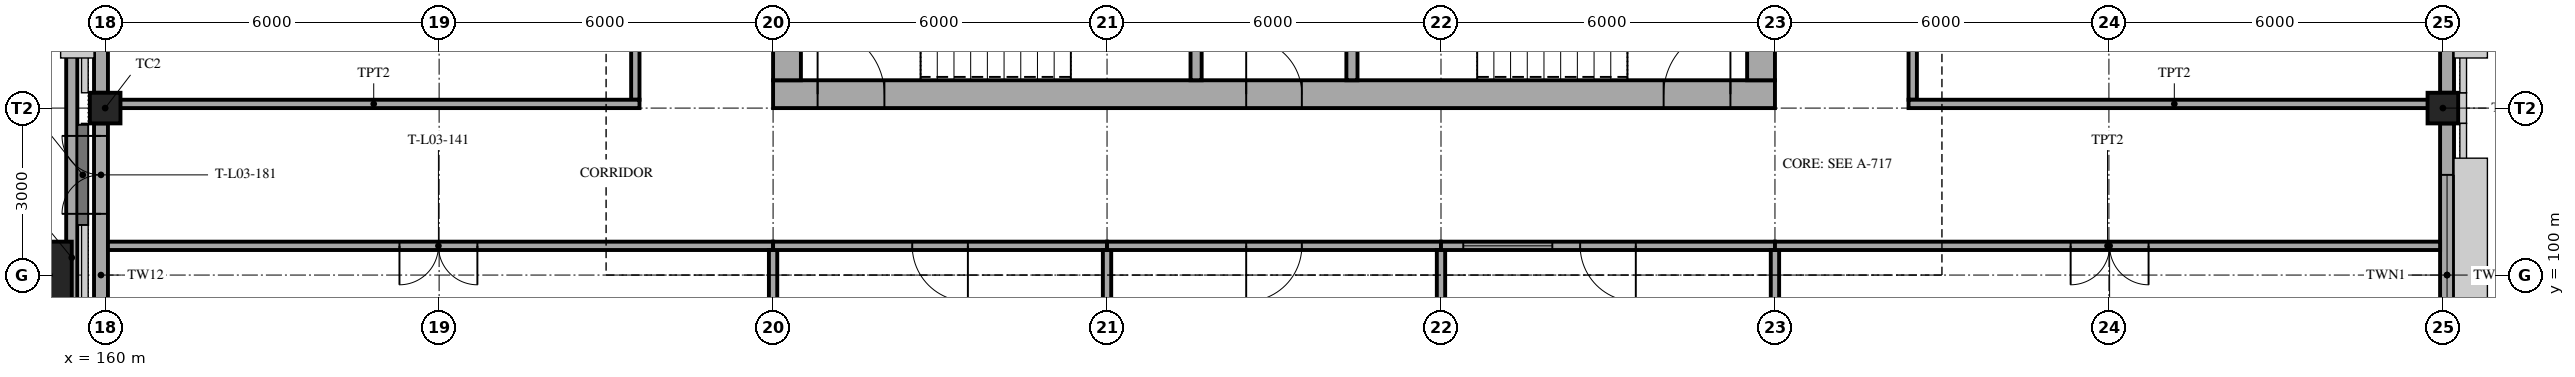
"""IFC4 building model, lengths in metres.
Left out: names, types, materials, properties, quantities, classifications, styles, units other than length and angle.
Written with IfcOpenShell. Run it as: python <this file> out.ifc"""

import sys

from ifc_helpers import new_model, si_unit, direction, frame, frame_2d, origin, origin_2d, place, context, subcontext, project, spatial, polyline, rectangle, hollow_rectangle, outline, extrude, element, fill, save


model = new_model("IFC4")
c1 = context("Model", 3, precision=1e-05, world=origin(), true_north=direction((0.0, 1.0)))
c2 = subcontext(c1, "Body", "Model", "MODEL_VIEW")
j1 = project(units=[si_unit("LENGTHUNIT", "METRE"), si_unit("PLANEANGLEUNIT", "RADIAN")], contexts=[c1])
p1 = place(None, origin())
s1 = spatial("IfcSite", under=j1, at=p1, CompositionType="ELEMENT")
p2 = place(p1, origin())
s2 = spatial("IfcBuilding", under=s1, at=p2, CompositionType="ELEMENT")
p3 = place(p2, frame((0.0, 0.0, 15.0)))
s3 = spatial("IfcBuildingStorey", under=s2, at=p3, CompositionType="ELEMENT", Elevation=15.0)
for number, where, z_axis, x_axis in (
    (1, (160.0, 103.0, 0.0), (0.0, 0.0, 1.0), (1.0, 0.0, 0.0)),
    (2, (202.0, 103.0, 0.0), (0.0, 0.0, 1.0), (1.0, 0.0, 0.0)),
):
    element("IfcColumn", number, at=place(p3, frame(where, z_axis=z_axis, x_axis=x_axis)), inside=s3, PredefinedType="COLUMN", context=c2, shape_type="SweptSolid", body=[
        extrude(hollow_rectangle(XDim=0.55, YDim=0.55, WallThickness=0.032, at=origin_2d()), origin(), (0.0, 0.0, 1.0), 4.2),
    ])
p4 = place(p3, frame((172.0, 103.25, 0.0), z_axis=(0.0, 0.0, 1.0), x_axis=(1.0, 0.0, 0.0)))
e3 = element("IfcWall", 3, at=p4, inside=s3, PredefinedType="SHEAR", context=c2, shape_type="SweptSolid", body=[
    extrude(rectangle(XDim=18.0, YDim=0.5, at=frame_2d((9.0, 0.0))), origin(), (0.0, 0.0, 1.0), 4.2),
])
p5 = place(p4, frame((8.5, 0.0, 0.0)))
e4 = element("IfcOpeningElement", 4, at=p5, cuts=e3, PredefinedType="OPENING", context=c2, shape_type="SweptSolid", body=[
    extrude(rectangle(XDim=1.0, YDim=2.1, at=frame_2d((0.5, 1.05))), frame((0.0, 0.26, 0.0), z_axis=(0.0, -1.0, 0.0), x_axis=(1.0, 0.0, 0.0)), (0.0, 0.0, 1.0), 0.52),
])
p6 = place(p4, frame((0.8, 0.0, 0.0)))
e5 = element("IfcOpeningElement", 5, at=p6, cuts=e3, PredefinedType="OPENING", context=c2, shape_type="SweptSolid", body=[
    extrude(rectangle(XDim=1.2, YDim=2.1, at=frame_2d((0.6, 1.05))), frame((0.0, 0.26, 0.0), z_axis=(0.0, -1.0, 0.0), x_axis=(1.0, 0.0, 0.0)), (0.0, 0.0, 1.0), 0.52),
])
p7 = place(p4, frame((16.0, 0.0, 0.0)))
e6 = element("IfcOpeningElement", 6, at=p7, cuts=e3, PredefinedType="OPENING", context=c2, shape_type="SweptSolid", body=[
    extrude(rectangle(XDim=1.2, YDim=2.1, at=frame_2d((0.6, 1.05))), frame((0.0, 0.26, 0.0), z_axis=(0.0, -1.0, 0.0), x_axis=(1.0, 0.0, 0.0)), (0.0, 0.0, 1.0), 0.52),
])
p8 = place(p3, frame((172.25, 103.5, 0.0), z_axis=(0.0, 0.0, 1.0), x_axis=(0.0, 1.0, 0.0)))
e7 = element("IfcWall", 7, at=p8, inside=s3, PredefinedType="SHEAR", context=c2, shape_type="SweptSolid", body=[
    extrude(rectangle(XDim=17.0, YDim=0.5, at=frame_2d((8.5, 0.0))), origin(), (0.0, 0.0, 1.0), 4.2),
])
p9 = place(p8, frame((7.2, 0.0, 0.0)))
e8 = element("IfcOpeningElement", 8, at=p9, cuts=e7, PredefinedType="OPENING", context=c2, shape_type="SweptSolid", body=[
    extrude(rectangle(XDim=1.4, YDim=2.1, at=frame_2d((0.7, 1.05))), frame((0.0, 0.26, 0.0), z_axis=(0.0, -1.0, 0.0), x_axis=(1.0, 0.0, 0.0)), (0.0, 0.0, 1.0), 0.52),
])
p10 = place(p3, frame((189.75, 103.5, 0.0), z_axis=(0.0, 0.0, 1.0), x_axis=(0.0, 1.0, 0.0)))
e9 = element("IfcWall", 9, at=p10, inside=s3, PredefinedType="SHEAR", context=c2, shape_type="SweptSolid", body=[
    extrude(rectangle(XDim=17.0, YDim=0.5, at=frame_2d((8.5, 0.0))), origin(), (0.0, 0.0, 1.0), 4.2),
])
p11 = place(p10, frame((7.2, 0.0, 0.0)))
e10 = element("IfcOpeningElement", 10, at=p11, cuts=e9, PredefinedType="OPENING", context=c2, shape_type="SweptSolid", body=[
    extrude(rectangle(XDim=1.4, YDim=2.1, at=frame_2d((0.7, 1.05))), frame((0.0, 0.26, 0.0), z_axis=(0.0, -1.0, 0.0), x_axis=(1.0, 0.0, 0.0)), (0.0, 0.0, 1.0), 0.52),
])
p12 = place(p3, frame((159.0, 100.0, 0.0), z_axis=(0.0, 0.0, 1.0), x_axis=(1.0, 0.0, 0.0)))
e11 = element("IfcColumn", 11, at=p12, inside=s3, PredefinedType="COLUMN", context=c2, shape_type="SweptSolid", body=[
    extrude(rectangle(XDim=0.8, YDim=1.2, at=origin_2d()), origin(), (0.0, 0.0, 1.0), 4.2),
])
p13 = place(p3, frame((159.4, 91.225, 4.2), z_axis=(0.0, 0.0, 1.0), x_axis=(0.0, 1.0, 0.0)))
e12 = element("IfcWall", 12, at=p13, inside=s3, PredefinedType="PARAPET", context=c2, shape_type="SweptSolid", body=[
    extrude(rectangle(XDim=18.175, YDim=0.2, at=frame_2d((9.087, 0.0))), origin(), (0.0, 0.0, 1.0), 1.1),
])
p14 = place(p3, frame((159.925, 97.275, 0.0), z_axis=(0.0, 0.0, 1.0), x_axis=(0.0, 1.0, 0.0)))
e13 = element("IfcWall", 13, at=p14, inside=s3, PredefinedType="SOLIDWALL", context=c2, shape_type="SweptSolid", body=[
    extrude(rectangle(XDim=5.45, YDim=0.25, at=frame_2d((2.725, 0.0))), origin(), (0.0, 0.0, 1.0), 3.55),
])
p15 = place(p14, frame((3.825, 0.0, 0.0)))
e14 = element("IfcOpeningElement", 14, at=p15, cuts=e13, PredefinedType="OPENING", context=c2, shape_type="SweptSolid", body=[
    extrude(rectangle(XDim=1.4, YDim=2.1, at=frame_2d((0.7, 1.05))), frame((0.0, 0.135, 0.0), z_axis=(0.0, -1.0, 0.0), x_axis=(1.0, 0.0, 0.0)), (0.0, 0.0, 1.0), 0.27),
])
p16 = place(p3, frame((159.925, 103.275, 0.0), z_axis=(0.0, 0.0, 1.0), x_axis=(0.0, 1.0, 0.0)))
e15 = element("IfcWall", 15, at=p16, inside=s3, PredefinedType="SOLIDWALL", context=c2, shape_type="SweptSolid", body=[
    extrude(rectangle(XDim=5.45, YDim=0.25, at=frame_2d((2.725, 0.0))), origin(), (0.0, 0.0, 1.0), 3.55),
])
p17 = place(p16, frame((0.925, 0.0, 0.9)))
e16 = element("IfcOpeningElement", 16, at=p17, cuts=e15, PredefinedType="OPENING", context=c2, shape_type="SweptSolid", body=[
    extrude(rectangle(XDim=3.6, YDim=2.4, at=frame_2d((1.8, 1.2))), frame((0.0, 0.135, 0.0), z_axis=(0.0, -1.0, 0.0), x_axis=(1.0, 0.0, 0.0)), (0.0, 0.0, 1.0), 0.27),
])
p18 = place(p3, frame((202.075, 97.275, 0.0), z_axis=(0.0, 0.0, 1.0), x_axis=(0.0, 1.0, 0.0)))
e17 = element("IfcWall", 17, at=p18, inside=s3, PredefinedType="SOLIDWALL", context=c2, shape_type="SweptSolid", body=[
    extrude(rectangle(XDim=5.45, YDim=0.25, at=frame_2d((2.725, 0.0))), origin(), (0.0, 0.0, 1.0), 3.55),
])
p19 = place(p18, frame((0.925, 0.0, 0.9)))
e18 = element("IfcOpeningElement", 18, at=p19, cuts=e17, PredefinedType="OPENING", context=c2, shape_type="SweptSolid", body=[
    extrude(rectangle(XDim=3.6, YDim=2.4, at=frame_2d((1.8, 1.2))), frame((0.0, 0.135, 0.0), z_axis=(0.0, -1.0, 0.0), x_axis=(1.0, 0.0, 0.0)), (0.0, 0.0, 1.0), 0.27),
])
p20 = place(p3, frame((202.075, 103.275, 0.0), z_axis=(0.0, 0.0, 1.0), x_axis=(0.0, 1.0, 0.0)))
e19 = element("IfcWall", 19, at=p20, inside=s3, PredefinedType="SOLIDWALL", context=c2, shape_type="SweptSolid", body=[
    extrude(rectangle(XDim=5.45, YDim=0.25, at=frame_2d((2.725, 0.0))), origin(), (0.0, 0.0, 1.0), 3.55),
])
p21 = place(p20, frame((0.925, 0.0, 0.9)))
e20 = element("IfcOpeningElement", 20, at=p21, cuts=e19, PredefinedType="OPENING", context=c2, shape_type="SweptSolid", body=[
    extrude(rectangle(XDim=3.6, YDim=2.4, at=frame_2d((1.8, 1.2))), frame((0.0, 0.135, 0.0), z_axis=(0.0, -1.0, 0.0), x_axis=(1.0, 0.0, 0.0)), (0.0, 0.0, 1.0), 0.27),
])
for number, where, z_axis, x_axis in (
    (21, (179.6, 103.5, 0.0), (0.0, 0.0, 1.0), (0.0, 1.0, 0.0)),
    (22, (182.4, 103.5, 0.0), (0.0, 0.0, 1.0), (0.0, 1.0, 0.0)),
):
    element("IfcWall", number, at=place(p3, frame(where, z_axis=z_axis, x_axis=x_axis)), inside=s3, PredefinedType="SOLIDWALL", context=c2, shape_type="SweptSolid", body=[
        extrude(rectangle(XDim=3.2, YDim=0.2, at=frame_2d((1.6, 0.0))), origin(), (0.0, 0.0, 1.0), 4.0),
    ])
p22 = place(p3, frame((160.05, 100.525, 0.0), z_axis=(0.0, 0.0, 1.0), x_axis=(1.0, 0.0, 0.0)))
e23 = element("IfcWall", 23, at=p22, inside=s3, PredefinedType="PARTITIONING", context=c2, shape_type="SweptSolid", body=[
    extrude(rectangle(XDim=11.95, YDim=0.15, at=frame_2d((5.975, 0.0))), origin(), (0.0, 0.0, 1.0), 3.4),
])
p23 = place(p22, frame((5.238, 0.0, 0.0)))
e24 = element("IfcOpeningElement", 24, at=p23, cuts=e23, PredefinedType="OPENING", context=c2, shape_type="SweptSolid", body=[
    extrude(rectangle(XDim=1.4, YDim=2.1, at=frame_2d((0.7, 1.05))), frame((0.0, 0.085, 0.0), z_axis=(0.0, -1.0, 0.0), x_axis=(1.0, 0.0, 0.0)), (0.0, 0.0, 1.0), 0.17),
])
p24 = place(p3, frame((172.0, 91.05, 0.0), z_axis=(0.0, 0.0, 1.0), x_axis=(0.0, 1.0, 0.0)))
e25 = element("IfcWall", 25, at=p24, inside=s3, PredefinedType="PARTITIONING", context=c2, shape_type="SweptSolid", body=[
    extrude(rectangle(XDim=9.4, YDim=0.15, at=frame_2d((4.7, 0.0))), origin(), (0.0, 0.0, 1.0), 3.4),
])
p25 = place(p3, frame((172.0, 100.525, 0.0), z_axis=(0.0, 0.0, 1.0), x_axis=(1.0, 0.0, 0.0)))
e26 = element("IfcWall", 26, at=p25, inside=s3, PredefinedType="PARTITIONING", context=c2, shape_type="SweptSolid", body=[
    extrude(rectangle(XDim=6.0, YDim=0.15, at=frame_2d((3.0, 0.0))), origin(), (0.0, 0.0, 1.0), 3.4),
])
p26 = place(p25, frame((2.5, 0.0, 0.0)))
e27 = element("IfcOpeningElement", 27, at=p26, cuts=e26, PredefinedType="OPENING", context=c2, shape_type="SweptSolid", body=[
    extrude(rectangle(XDim=1.0, YDim=2.1, at=frame_2d((0.5, 1.05))), frame((0.0, 0.085, 0.0), z_axis=(0.0, -1.0, 0.0), x_axis=(1.0, 0.0, 0.0)), (0.0, 0.0, 1.0), 0.17),
])
p27 = place(p3, frame((178.0, 91.05, 0.0), z_axis=(0.0, 0.0, 1.0), x_axis=(0.0, 1.0, 0.0)))
e28 = element("IfcWall", 28, at=p27, inside=s3, PredefinedType="PARTITIONING", context=c2, shape_type="SweptSolid", body=[
    extrude(rectangle(XDim=9.4, YDim=0.15, at=frame_2d((4.7, 0.0))), origin(), (0.0, 0.0, 1.0), 3.4),
])
p28 = place(p3, frame((178.0, 100.525, 0.0), z_axis=(0.0, 0.0, 1.0), x_axis=(1.0, 0.0, 0.0)))
e29 = element("IfcWall", 29, at=p28, inside=s3, PredefinedType="PARTITIONING", context=c2, shape_type="SweptSolid", body=[
    extrude(rectangle(XDim=6.0, YDim=0.15, at=frame_2d((3.0, 0.0))), origin(), (0.0, 0.0, 1.0), 3.4),
])
p29 = place(p28, frame((2.5, 0.0, 0.0)))
e30 = element("IfcOpeningElement", 30, at=p29, cuts=e29, PredefinedType="OPENING", context=c2, shape_type="SweptSolid", body=[
    extrude(rectangle(XDim=1.0, YDim=2.1, at=frame_2d((0.5, 1.05))), frame((0.0, 0.085, 0.0), z_axis=(0.0, -1.0, 0.0), x_axis=(1.0, 0.0, 0.0)), (0.0, 0.0, 1.0), 0.17),
])
p30 = place(p3, frame((184.0, 91.05, 0.0), z_axis=(0.0, 0.0, 1.0), x_axis=(0.0, 1.0, 0.0)))
e31 = element("IfcWall", 31, at=p30, inside=s3, PredefinedType="PARTITIONING", context=c2, shape_type="SweptSolid", body=[
    extrude(rectangle(XDim=9.4, YDim=0.15, at=frame_2d((4.7, 0.0))), origin(), (0.0, 0.0, 1.0), 3.4),
])
p31 = place(p3, frame((184.0, 100.525, 0.0), z_axis=(0.0, 0.0, 1.0), x_axis=(1.0, 0.0, 0.0)))
e32 = element("IfcWall", 32, at=p31, inside=s3, PredefinedType="PARTITIONING", context=c2, shape_type="SweptSolid", body=[
    extrude(rectangle(XDim=6.0, YDim=0.15, at=frame_2d((3.0, 0.0))), origin(), (0.0, 0.0, 1.0), 3.4),
])
p32 = place(p31, frame((0.4, 0.0, 0.9)))
e33 = element("IfcOpeningElement", 33, at=p32, cuts=e32, PredefinedType="OPENING", context=c2, shape_type="SweptSolid", body=[
    extrude(rectangle(XDim=1.6, YDim=1.2, at=frame_2d((0.8, 0.6))), frame((0.0, 0.085, 0.0), z_axis=(0.0, -1.0, 0.0), x_axis=(1.0, 0.0, 0.0)), (0.0, 0.0, 1.0), 0.17),
])
p33 = place(p31, frame((2.5, 0.0, 0.0)))
e34 = element("IfcOpeningElement", 34, at=p33, cuts=e32, PredefinedType="OPENING", context=c2, shape_type="SweptSolid", body=[
    extrude(rectangle(XDim=1.0, YDim=2.1, at=frame_2d((0.5, 1.05))), frame((0.0, 0.085, 0.0), z_axis=(0.0, -1.0, 0.0), x_axis=(1.0, 0.0, 0.0)), (0.0, 0.0, 1.0), 0.17),
])
p34 = place(p3, frame((190.0, 91.05, 0.0), z_axis=(0.0, 0.0, 1.0), x_axis=(0.0, 1.0, 0.0)))
e35 = element("IfcWall", 35, at=p34, inside=s3, PredefinedType="PARTITIONING", context=c2, shape_type="SweptSolid", body=[
    extrude(rectangle(XDim=9.4, YDim=0.15, at=frame_2d((4.7, 0.0))), origin(), (0.0, 0.0, 1.0), 3.4),
])
p35 = place(p3, frame((190.0, 100.525, 0.0), z_axis=(0.0, 0.0, 1.0), x_axis=(1.0, 0.0, 0.0)))
e36 = element("IfcWall", 36, at=p35, inside=s3, PredefinedType="PARTITIONING", context=c2, shape_type="SweptSolid", body=[
    extrude(rectangle(XDim=11.95, YDim=0.15, at=frame_2d((5.975, 0.0))), origin(), (0.0, 0.0, 1.0), 3.4),
])
p36 = place(p35, frame((5.312, 0.0, 0.0)))
e37 = element("IfcOpeningElement", 37, at=p36, cuts=e36, PredefinedType="OPENING", context=c2, shape_type="SweptSolid", body=[
    extrude(rectangle(XDim=1.4, YDim=2.1, at=frame_2d((0.7, 1.05))), frame((0.0, 0.085, 0.0), z_axis=(0.0, -1.0, 0.0), x_axis=(1.0, 0.0, 0.0)), (0.0, 0.0, 1.0), 0.17),
])
p37 = place(p3, frame((169.525, 103.15, 0.0), z_axis=(0.0, 0.0, 1.0), x_axis=(0.0, 1.0, 0.0)))
e38 = element("IfcWall", 38, at=p37, inside=s3, PredefinedType="PARTITIONING", context=c2, shape_type="SweptSolid", body=[
    extrude(rectangle(XDim=11.85, YDim=0.15, at=frame_2d((5.925, 0.0))), origin(), (0.0, 0.0, 1.0), 3.4),
])
p38 = place(p37, frame((5.188, 0.0, 0.0)))
e39 = element("IfcOpeningElement", 39, at=p38, cuts=e38, PredefinedType="OPENING", context=c2, shape_type="SweptSolid", body=[
    extrude(rectangle(XDim=1.4, YDim=2.1, at=frame_2d((0.7, 1.05))), frame((0.0, 0.085, 0.0), z_axis=(0.0, -1.0, 0.0), x_axis=(1.0, 0.0, 0.0)), (0.0, 0.0, 1.0), 0.17),
])
p39 = place(p3, frame((192.475, 103.15, 0.0), z_axis=(0.0, 0.0, 1.0), x_axis=(0.0, 1.0, 0.0)))
e40 = element("IfcWall", 40, at=p39, inside=s3, PredefinedType="PARTITIONING", context=c2, shape_type="SweptSolid", body=[
    extrude(rectangle(XDim=5.85, YDim=0.15, at=frame_2d((2.925, 0.0))), origin(), (0.0, 0.0, 1.0), 3.4),
])
p40 = place(p39, frame((2.387, 0.0, 0.0)))
e41 = element("IfcOpeningElement", 41, at=p40, cuts=e40, PredefinedType="OPENING", context=c2, shape_type="SweptSolid", body=[
    extrude(rectangle(XDim=1.0, YDim=2.1, at=frame_2d((0.5, 1.05))), frame((0.0, 0.085, 0.0), z_axis=(0.0, -1.0, 0.0), x_axis=(1.0, 0.0, 0.0)), (0.0, 0.0, 1.0), 0.17),
])
for number, where, z_axis, x_axis in (
    (42, (160.05, 103.075, 0.0), (0.0, 0.0, 1.0), (1.0, 0.0, 0.0)),
    (43, (192.4, 103.075, 0.0), (0.0, 0.0, 1.0), (1.0, 0.0, 0.0)),
):
    element("IfcWall", number, at=place(p3, frame(where, z_axis=z_axis, x_axis=x_axis)), inside=s3, PredefinedType="PARTITIONING", context=c2, shape_type="SweptSolid", body=[
        extrude(rectangle(XDim=9.55, YDim=0.15, at=frame_2d((4.775, 0.0))), origin(), (0.0, 0.0, 1.0), 3.4),
    ])
p41 = place(p15, origin())
e44 = element("IfcDoor", 44, at=p41, inside=s3, OperationType="DOUBLE_DOOR_SINGLE_SWING", PredefinedType="DOOR", context=c2, shape_type="SweptSolid", body=[
    extrude(rectangle(XDim=1.4, YDim=2.1, at=frame_2d((0.7, 1.05))), frame((0.0, 0.025, 0.0), z_axis=(0.0, -1.0, 0.0), x_axis=(1.0, 0.0, 0.0)), (0.0, 0.0, 1.0), 0.05),
])
fill(e14, e44)
p42 = place(p19, origin())
e45 = element("IfcWindow", 45, at=p42, inside=s3, PartitioningType="TRIPLE_PANEL_VERTICAL", PredefinedType="WINDOW", context=c2, shape_type="SweptSolid", body=[
    extrude(outline(polyline([(0.0, 0.0), (3.6, 0.0), (3.6, 2.4), (0.0, 2.4), (0.0, 0.0)]), holes=[polyline([(0.06, 0.06), (0.96, 0.06), (0.96, 2.34), (0.06, 2.34), (0.06, 0.06)]), polyline([(1.06, 0.06), (2.54, 0.06), (2.54, 2.34), (1.06, 2.34), (1.06, 0.06)]), polyline([(2.64, 0.06), (3.54, 0.06), (3.54, 2.34), (2.64, 2.34), (2.64, 0.06)])]), frame((0.0, 0.03, 0.0), z_axis=(0.0, -1.0, 0.0), x_axis=(1.0, 0.0, 0.0)), (0.0, 0.0, 1.0), 0.06),
    extrude(rectangle(XDim=0.924, YDim=2.304, at=frame_2d((0.51, 1.2))), frame((0.0, 0.01, 0.0), z_axis=(0.0, -1.0, 0.0), x_axis=(1.0, 0.0, 0.0)), (0.0, 0.0, 1.0), 0.02),
    extrude(rectangle(XDim=1.504, YDim=2.304, at=frame_2d((1.8, 1.2))), frame((0.0, 0.01, 0.0), z_axis=(0.0, -1.0, 0.0), x_axis=(1.0, 0.0, 0.0)), (0.0, 0.0, 1.0), 0.02),
    extrude(rectangle(XDim=0.924, YDim=2.304, at=frame_2d((3.09, 1.2))), frame((0.0, 0.01, 0.0), z_axis=(0.0, -1.0, 0.0), x_axis=(1.0, 0.0, 0.0)), (0.0, 0.0, 1.0), 0.02),
])
fill(e18, e45)
p43 = place(p5, origin())
e46 = element("IfcDoor", 46, at=p43, inside=s3, OperationType="SINGLE_SWING_LEFT", PredefinedType="DOOR", context=c2, shape_type="SweptSolid", body=[
    extrude(rectangle(XDim=1.0, YDim=2.1, at=frame_2d((0.5, 1.05))), frame((0.0, 0.025, 0.0), z_axis=(0.0, -1.0, 0.0), x_axis=(1.0, 0.0, 0.0)), (0.0, 0.0, 1.0), 0.05),
])
fill(e4, e46)
p44 = place(p6, origin())
e47 = element("IfcDoor", 47, at=p44, inside=s3, OperationType="SINGLE_SWING_LEFT", PredefinedType="DOOR", context=c2, shape_type="SweptSolid", body=[
    extrude(rectangle(XDim=1.2, YDim=2.1, at=frame_2d((0.6, 1.05))), frame((0.0, 0.025, 0.0), z_axis=(0.0, -1.0, 0.0), x_axis=(1.0, 0.0, 0.0)), (0.0, 0.0, 1.0), 0.05),
])
fill(e5, e47)
p45 = place(p7, origin())
e48 = element("IfcDoor", 48, at=p45, inside=s3, OperationType="SINGLE_SWING_RIGHT", PredefinedType="DOOR", context=c2, shape_type="SweptSolid", body=[
    extrude(rectangle(XDim=1.2, YDim=2.1, at=frame_2d((0.6, 1.05))), frame((0.0, 0.025, 0.0), z_axis=(0.0, -1.0, 0.0), x_axis=(1.0, 0.0, 0.0)), (0.0, 0.0, 1.0), 0.05),
])
fill(e6, e48)
p46 = place(p32, origin())
e49 = element("IfcWindow", 49, at=p46, inside=s3, PartitioningType="SINGLE_PANEL", PredefinedType="WINDOW", context=c2, shape_type="SweptSolid", body=[
    extrude(rectangle(XDim=1.6, YDim=1.2, at=frame_2d((0.8, 0.6))), frame((0.0, 0.03, 0.0), z_axis=(0.0, -1.0, 0.0), x_axis=(1.0, 0.0, 0.0)), (0.0, 0.0, 1.0), 0.06),
])
fill(e33, e49)
p47 = place(p23, frame((1.4, 0.0, 0.0), z_axis=(0.0, 0.0, 1.0), x_axis=(-1.0, 0.0, 0.0)))
e50 = element("IfcDoor", 50, at=p47, inside=s3, OperationType="DOUBLE_DOOR_SINGLE_SWING", PredefinedType="DOOR", context=c2, shape_type="SweptSolid", body=[
    extrude(rectangle(XDim=1.4, YDim=2.1, at=frame_2d((0.7, 1.05))), frame((0.0, 0.025, 0.0), z_axis=(0.0, -1.0, 0.0), x_axis=(1.0, 0.0, 0.0)), (0.0, 0.0, 1.0), 0.05),
])
fill(e24, e50)
p48 = place(p26, frame((1.0, 0.0, 0.0), z_axis=(0.0, 0.0, 1.0), x_axis=(-1.0, 0.0, 0.0)))
e51 = element("IfcDoor", 51, at=p48, inside=s3, OperationType="SINGLE_SWING_LEFT", PredefinedType="DOOR", context=c2, shape_type="SweptSolid", body=[
    extrude(rectangle(XDim=1.0, YDim=2.1, at=frame_2d((0.5, 1.05))), frame((0.0, 0.025, 0.0), z_axis=(0.0, -1.0, 0.0), x_axis=(1.0, 0.0, 0.0)), (0.0, 0.0, 1.0), 0.05),
])
fill(e27, e51)
p49 = place(p29, frame((1.0, 0.0, 0.0), z_axis=(0.0, 0.0, 1.0), x_axis=(-1.0, 0.0, 0.0)))
e52 = element("IfcDoor", 52, at=p49, inside=s3, OperationType="SINGLE_SWING_RIGHT", PredefinedType="DOOR", context=c2, shape_type="SweptSolid", body=[
    extrude(rectangle(XDim=1.0, YDim=2.1, at=frame_2d((0.5, 1.05))), frame((0.0, 0.025, 0.0), z_axis=(0.0, -1.0, 0.0), x_axis=(1.0, 0.0, 0.0)), (0.0, 0.0, 1.0), 0.05),
])
fill(e30, e52)
p50 = place(p33, frame((1.0, 0.0, 0.0), z_axis=(0.0, 0.0, 1.0), x_axis=(-1.0, 0.0, 0.0)))
e53 = element("IfcDoor", 53, at=p50, inside=s3, OperationType="SINGLE_SWING_LEFT", PredefinedType="DOOR", context=c2, shape_type="SweptSolid", body=[
    extrude(rectangle(XDim=1.0, YDim=2.1, at=frame_2d((0.5, 1.05))), frame((0.0, 0.025, 0.0), z_axis=(0.0, -1.0, 0.0), x_axis=(1.0, 0.0, 0.0)), (0.0, 0.0, 1.0), 0.05),
])
fill(e34, e53)
p51 = place(p36, frame((1.4, 0.0, 0.0), z_axis=(0.0, 0.0, 1.0), x_axis=(-1.0, 0.0, 0.0)))
e54 = element("IfcDoor", 54, at=p51, inside=s3, OperationType="DOUBLE_DOOR_SINGLE_SWING", PredefinedType="DOOR", context=c2, shape_type="SweptSolid", body=[
    extrude(rectangle(XDim=1.4, YDim=2.1, at=frame_2d((0.7, 1.05))), frame((0.0, 0.025, 0.0), z_axis=(0.0, -1.0, 0.0), x_axis=(1.0, 0.0, 0.0)), (0.0, 0.0, 1.0), 0.05),
])
fill(e37, e54)
save(model, sys.argv[1])
